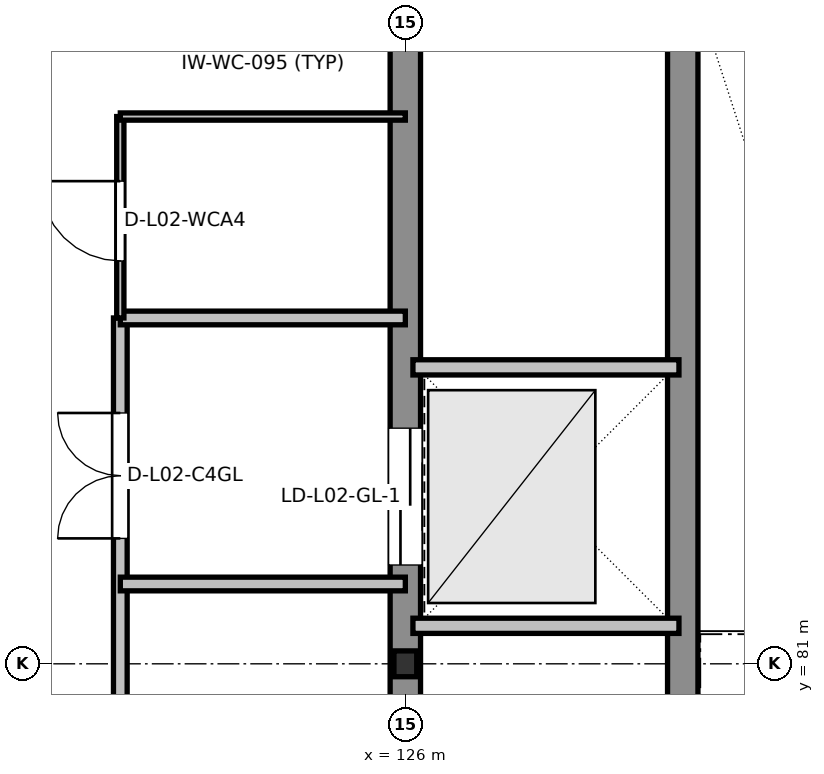
"""IFC4 building model, lengths in metres.
Left out: names, types, materials, properties, quantities, classifications, styles, units other than length and angle.
Written with IfcOpenShell. Run it as: python <this file> out.ifc"""

import sys

from ifc_helpers import new_model, si_unit, direction, frame, frame_2d, origin, origin_2d, place, context, subcontext, project, spatial, rectangle, i_section, extrude, element, fill, save


model = new_model("IFC4")
c1 = context("Model", 3, precision=1e-05, world=origin(), true_north=direction((0.0, 1.0)))
c2 = subcontext(c1, "Body", "Model", "MODEL_VIEW")
j1 = project(units=[si_unit("LENGTHUNIT", "METRE"), si_unit("PLANEANGLEUNIT", "RADIAN")], contexts=[c1])
p1 = place(None, origin())
s1 = spatial("IfcSite", under=j1, at=p1, CompositionType="ELEMENT")
p2 = place(p1, origin())
s2 = spatial("IfcBuilding", under=s1, at=p2, CompositionType="ELEMENT")
p3 = place(p2, frame((0.0, 0.0, 10.2)))
s3 = spatial("IfcBuildingStorey", under=s2, at=p3, CompositionType="ELEMENT", Elevation=10.2)
p4 = place(p3, frame((126.0, 81.0, 0.0), z_axis=(0.0, 0.0, 1.0), x_axis=(1.0, 0.0, 0.0)))
e1 = element("IfcColumn", 1, at=p4, inside=s3, PredefinedType="COLUMN", context=c2, shape_type="SweptSolid", body=[
    extrude(i_section(OverallWidth=0.3, OverallDepth=0.34, WebThickness=0.012, FlangeThickness=0.021, at=origin_2d()), origin(), (0.0, 0.0, 1.0), 4.8),
])
p5 = place(p3, frame((126.0, 90.0, 0.0), z_axis=(0.0, 0.0, 1.0), x_axis=(0.0, -1.0, 0.0)))
e2 = element("IfcWall", 2, at=p5, inside=s3, PredefinedType="SHEAR", context=c2, shape_type="SweptSolid", body=[
    extrude(rectangle(XDim=18.0, YDim=0.4, at=frame_2d((9.0, 0.0))), origin(), (0.0, 0.0, 1.0), 4.56),
])
p6 = place(p5, frame((16.1, 0.0, 0.0)))
e3 = element("IfcOpeningElement", 3, at=p6, cuts=e2, PredefinedType="OPENING", context=c2, shape_type="SweptSolid", body=[
    extrude(rectangle(XDim=1.1, YDim=2.16, at=frame_2d((0.55, 1.08))), frame((0.0, 0.21, 0.0), z_axis=(0.0, -1.0, 0.0), x_axis=(1.0, 0.0, 0.0)), (0.0, 0.0, 1.0), 0.42),
])
p7 = place(p5, frame((13.45, 0.0, 0.0)))
e4 = element("IfcOpeningElement", 4, at=p7, cuts=e2, PredefinedType="OPENING", context=c2, shape_type="SweptSolid", body=[
    extrude(rectangle(XDim=1.2, YDim=2.2, at=frame_2d((0.6, 1.1))), frame((0.0, 0.21, 0.0), z_axis=(0.0, -1.0, 0.0), x_axis=(1.0, 0.0, 0.0)), (0.0, 0.0, 1.0), 0.42),
])
p8 = place(p5, frame((10.65, 0.0, 0.0)))
e5 = element("IfcOpeningElement", 5, at=p8, cuts=e2, PredefinedType="OPENING", context=c2, shape_type="SweptSolid", body=[
    extrude(rectangle(XDim=1.2, YDim=2.2, at=frame_2d((0.6, 1.1))), frame((0.0, 0.21, 0.0), z_axis=(0.0, -1.0, 0.0), x_axis=(1.0, 0.0, 0.0)), (0.0, 0.0, 1.0), 0.42),
])
p9 = place(p5, frame((5.9, 0.0, 0.0)))
e6 = element("IfcOpeningElement", 6, at=p9, cuts=e2, PredefinedType="OPENING", context=c2, shape_type="SweptSolid", body=[
    extrude(rectangle(XDim=1.8, YDim=2.35, at=frame_2d((0.9, 1.175))), frame((0.0, 0.21, 0.0), z_axis=(0.0, -1.0, 0.0), x_axis=(1.0, 0.0, 0.0)), (0.0, 0.0, 1.0), 0.42),
])
p10 = place(p3, frame((129.65, 72.0, 0.0), z_axis=(0.0, 0.0, 1.0), x_axis=(0.0, 1.0, 0.0)))
e7 = element("IfcWall", 7, at=p10, inside=s3, PredefinedType="SHEAR", context=c2, shape_type="SweptSolid", body=[
    extrude(rectangle(XDim=18.0, YDim=0.4, at=frame_2d((9.0, 0.0))), origin(), (0.0, 0.0, 1.0), 4.56),
])
p11 = place(p10, frame((0.7, 0.0, 0.0)))
e8 = element("IfcOpeningElement", 8, at=p11, cuts=e7, PredefinedType="OPENING", context=c2, shape_type="SweptSolid", body=[
    extrude(rectangle(XDim=1.1, YDim=2.16, at=frame_2d((0.55, 1.08))), frame((0.0, 0.21, 0.0), z_axis=(0.0, -1.0, 0.0), x_axis=(1.0, 0.0, 0.0)), (0.0, 0.0, 1.0), 0.42),
])
for number, where, z_axis, x_axis in (
    (9, (126.1, 81.5, 0.0), (0.0, 0.0, 1.0), (1.0, 0.0, 0.0)),
    (10, (126.1, 84.9, 0.0), (0.0, 0.0, 1.0), (1.0, 0.0, 0.0)),
):
    element("IfcWall", number, at=place(p3, frame(where, z_axis=z_axis, x_axis=x_axis)), inside=s3, PredefinedType="PARTITIONING", context=c2, shape_type="SweptSolid", body=[
        extrude(rectangle(XDim=3.5, YDim=0.2, at=frame_2d((1.75, 0.0))), origin(), (0.0, 0.0, 1.0), 4.56),
    ])
p12 = place(p3, frame((122.25, 72.0, 0.0), z_axis=(0.0, 0.0, 1.0), x_axis=(0.0, 1.0, 0.0)))
e11 = element("IfcWall", 11, at=p12, inside=s3, PredefinedType="PARTITIONING", context=c2, shape_type="SweptSolid", body=[
    extrude(rectangle(XDim=13.55, YDim=0.18, at=frame_2d((6.775, 0.0))), origin(), (0.0, 0.0, 1.0), 4.56),
])
p13 = place(p12, frame((0.75, 0.0, 0.0)))
e12 = element("IfcOpeningElement", 12, at=p13, cuts=e11, PredefinedType="OPENING", context=c2, shape_type="SweptSolid", body=[
    extrude(rectangle(XDim=1.1, YDim=2.16, at=frame_2d((0.55, 1.08))), frame((0.0, 0.1, 0.0), z_axis=(0.0, -1.0, 0.0), x_axis=(1.0, 0.0, 0.0)), (0.0, 0.0, 1.0), 0.2),
])
p14 = place(p12, frame((3.2, 0.0, 0.0)))
e13 = element("IfcOpeningElement", 13, at=p14, cuts=e11, PredefinedType="OPENING", context=c2, shape_type="SweptSolid", body=[
    extrude(rectangle(XDim=1.4, YDim=2.2, at=frame_2d((0.7, 1.1))), frame((0.0, 0.1, 0.0), z_axis=(0.0, -1.0, 0.0), x_axis=(1.0, 0.0, 0.0)), (0.0, 0.0, 1.0), 0.2),
])
p15 = place(p12, frame((6.65, 0.0, 0.0)))
e14 = element("IfcOpeningElement", 14, at=p15, cuts=e11, PredefinedType="OPENING", context=c2, shape_type="SweptSolid", body=[
    extrude(rectangle(XDim=1.4, YDim=2.2, at=frame_2d((0.7, 1.1))), frame((0.0, 0.1, 0.0), z_axis=(0.0, -1.0, 0.0), x_axis=(1.0, 0.0, 0.0)), (0.0, 0.0, 1.0), 0.2),
])
p16 = place(p12, frame((10.65, 0.0, 0.0)))
e15 = element("IfcOpeningElement", 15, at=p16, cuts=e11, PredefinedType="OPENING", context=c2, shape_type="SweptSolid", body=[
    extrude(rectangle(XDim=1.65, YDim=2.25, at=frame_2d((0.825, 1.125))), frame((0.0, 0.1, 0.0), z_axis=(0.0, -1.0, 0.0), x_axis=(1.0, 0.0, 0.0)), (0.0, 0.0, 1.0), 0.2),
])
for number, where, z_axis, x_axis in (
    (16, (122.25, 82.05, 0.0), (0.0, 0.0, 1.0), (1.0, 0.0, 0.0)),
    (17, (122.25, 85.55, 0.0), (0.0, 0.0, 1.0), (1.0, 0.0, 0.0)),
):
    element("IfcWall", number, at=place(p3, frame(where, z_axis=z_axis, x_axis=x_axis)), inside=s3, PredefinedType="PARTITIONING", context=c2, shape_type="SweptSolid", body=[
        extrude(rectangle(XDim=3.75, YDim=0.18, at=frame_2d((1.875, 0.0))), origin(), (0.0, 0.0, 1.0), 4.56),
    ])
p17 = place(p3, frame((122.25, 85.55, 0.0), z_axis=(0.0, 0.0, 1.0), x_axis=(0.0, 1.0, 0.0)))
e18 = element("IfcWall", 18, at=p17, inside=s3, PredefinedType="PARTITIONING", context=c2, shape_type="SweptSolid", body=[
    extrude(rectangle(XDim=2.65, YDim=0.095, at=frame_2d((1.325, 0.0))), origin(), (0.0, 0.0, 1.0), 4.56),
])
p18 = place(p17, frame((0.75, 0.0, 0.0)))
e19 = element("IfcOpeningElement", 19, at=p18, cuts=e18, PredefinedType="OPENING", context=c2, shape_type="SweptSolid", body=[
    extrude(rectangle(XDim=1.05, YDim=2.13, at=frame_2d((0.525, 1.065))), frame((0.0, 0.057, 0.0), z_axis=(0.0, -1.0, 0.0), x_axis=(1.0, 0.0, 0.0)), (0.0, 0.0, 1.0), 0.115),
])
p19 = place(p3, frame((122.25, 88.2, 0.0), z_axis=(0.0, 0.0, 1.0), x_axis=(1.0, 0.0, 0.0)))
e20 = element("IfcWall", 20, at=p19, inside=s3, PredefinedType="PARTITIONING", context=c2, shape_type="SweptSolid", body=[
    extrude(rectangle(XDim=3.75, YDim=0.095, at=frame_2d((1.875, 0.0))), origin(), (0.0, 0.0, 1.0), 4.56),
])
p20 = place(p9, origin())
e21 = element("IfcDoor", 21, at=p20, inside=s3, OperationType="DOUBLE_DOOR_SLIDING", PredefinedType="DOOR", context=c2, shape_type="SweptSolid", body=[
    extrude(rectangle(XDim=1.8, YDim=2.35, at=frame_2d((0.9, 1.175))), frame((0.0, 0.025, 0.0), z_axis=(0.0, -1.0, 0.0), x_axis=(1.0, 0.0, 0.0)), (0.0, 0.0, 1.0), 0.05),
])
fill(e6, e21)
p21 = place(p16, origin())
e22 = element("IfcDoor", 22, at=p21, inside=s3, OperationType="DOUBLE_DOOR_SINGLE_SWING", PredefinedType="DOOR", context=c2, shape_type="SweptSolid", body=[
    extrude(rectangle(XDim=1.65, YDim=2.25, at=frame_2d((0.825, 1.125))), frame((0.0, 0.025, 0.0), z_axis=(0.0, -1.0, 0.0), x_axis=(1.0, 0.0, 0.0)), (0.0, 0.0, 1.0), 0.05),
])
fill(e15, e22)
p22 = place(p18, origin())
e23 = element("IfcDoor", 23, at=p22, inside=s3, OperationType="SINGLE_SWING_RIGHT", PredefinedType="DOOR", context=c2, shape_type="SweptSolid", body=[
    extrude(rectangle(XDim=1.05, YDim=2.13, at=frame_2d((0.525, 1.065))), frame((0.0, 0.025, 0.0), z_axis=(0.0, -1.0, 0.0), x_axis=(1.0, 0.0, 0.0)), (0.0, 0.0, 1.0), 0.05),
])
fill(e19, e23)
save(model, sys.argv[1])
